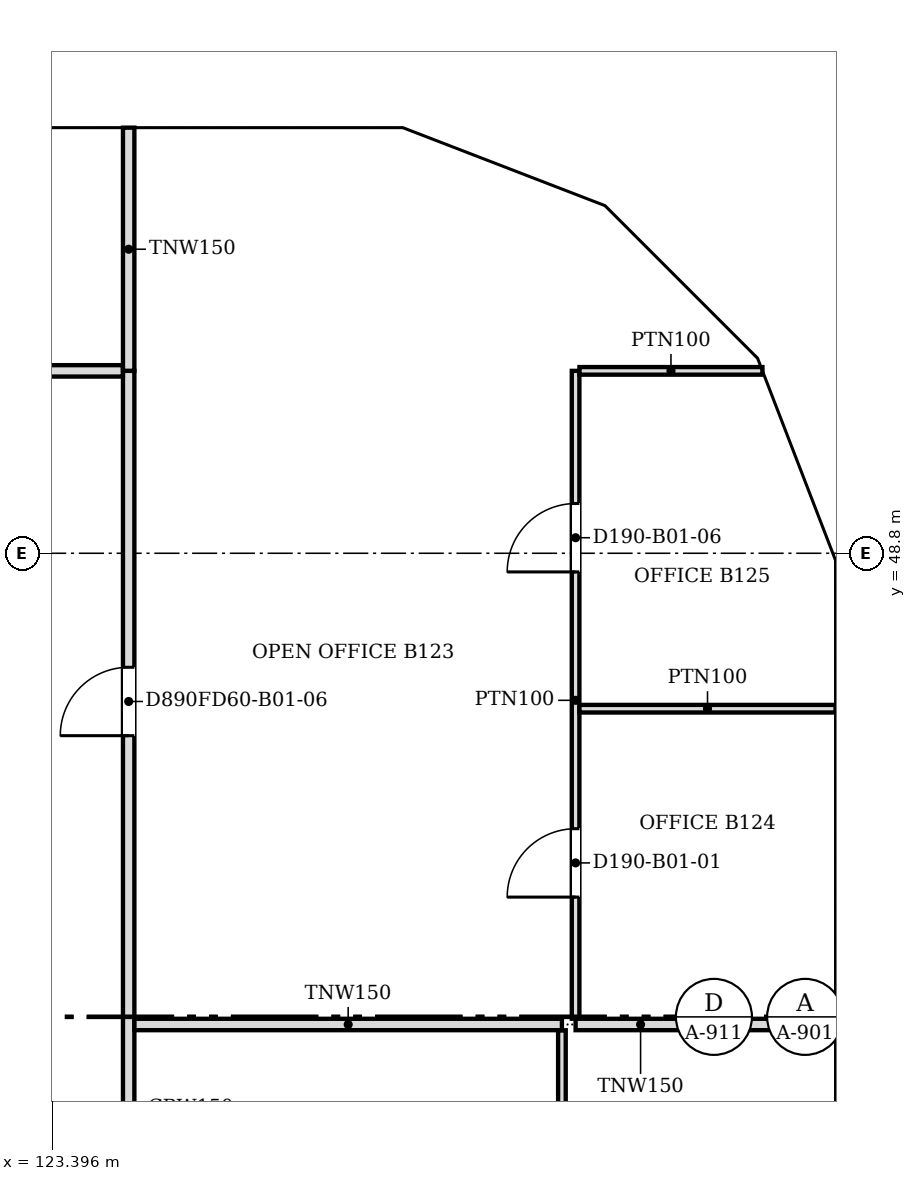
"""IFC4 building model, lengths in metres.
Left out: names, types, materials, properties, quantities, classifications, styles, units other than length and angle.
Written with IfcOpenShell. Run it as: python <this file> out.ifc"""

import sys

from ifc_helpers import new_model, si_unit, direction, frame, frame_2d, origin, place, context, subcontext, project, spatial, polyline, rectangle, outline, extrude, faceted_brep, source, transform, mapped, element, fill, save


model = new_model("IFC4")
c1 = context("Model", 3, precision=1e-05, world=origin(), true_north=direction((0.0, 1.0)))
c2 = subcontext(c1, "Body", "Model", "MODEL_VIEW")
j1 = project(units=[si_unit("LENGTHUNIT", "METRE"), si_unit("PLANEANGLEUNIT", "RADIAN")], contexts=[c1])
p1 = place(None, origin())
s1 = spatial("IfcSite", under=j1, at=p1, CompositionType="ELEMENT")
p2 = place(p1, origin())
s2 = spatial("IfcBuilding", under=s1, at=p2, CompositionType="ELEMENT")
p3 = place(p2, frame((0.0, 0.0, 16.8)))
s3 = spatial("IfcBuildingStorey", under=s2, at=p3, CompositionType="ELEMENT", Elevation=16.8)
m1 = source(origin(), c2, "Body", "Brep", [
    faceted_brep([(6.1, -0.25, 0.0), (3.05, -0.25, 4.5), (0.0, -0.25, 0.0), (6.1, -0.25, 0.0), (0.0, 0.25, 0.0), (3.05, 0.25, 4.5), (6.1, 0.25, 0.0), (6.1, 0.25, 0.0)], [[[0, 1, 2, 3]], [[4, 5, 6, 7]], [[6, 5, 1, 0]], [[5, 4, 2, 1]], [[4, 7, 3, 2]], [[3, 7, 6, 0]]]),
])
p4 = place(p3, frame((133.95, 36.6, 0.0), z_axis=(0.0, 0.0, 1.0), x_axis=(0.0, 1.0, 0.0)))
e1 = element("IfcWall", 1, at=p4, inside=s3, PredefinedType="SOLIDWALL", context=c2, shape_type="MappedRepresentation", body=[
    mapped(m1, transform((0.0, 0.0, 0.0), scale=1.0)),
])
m2 = source(origin(), c2, "Body", "SweptSolid", [
    extrude(outline(polyline([(5.629, 0.25), (3.05, 4.054), (0.471, 0.25), (5.629, 0.25)])), frame((0.0, 0.26, 0.0), z_axis=(0.0, -1.0, 0.0), x_axis=(1.0, 0.0, 0.0)), (0.0, 0.0, 1.0), 0.52),
])
p5 = place(p4, origin())
e2 = element("IfcOpeningElement", 2, at=p5, cuts=e1, PredefinedType="OPENING", context=c2, shape_type="MappedRepresentation", body=[
    mapped(m2, transform((0.0, 0.0, 0.0), scale=1.0)),
])
m3 = source(origin(), c2, "Body", "Brep", [
    faceted_brep([(6.053, -0.25, 0.0), (3.05, -0.25, 4.5), (0.0, -0.25, 0.0), (0.0, 0.25, 0.0), (3.05, 0.25, 4.5), (6.007, 0.25, 0.07), (6.007, 0.25, 0.0), (6.053, 0.0, 0.0)], [[[0, 1, 2]], [[3, 4, 5, 6]], [[5, 4, 1, 0, 7]], [[4, 3, 2, 1]], [[3, 6, 7, 0, 2]], [[7, 6, 5]]]),
])
p6 = place(p3, frame((133.95, 42.7, 0.0), z_axis=(0.0, 0.0, 1.0), x_axis=(0.0, 1.0, 0.0)))
e3 = element("IfcWall", 3, at=p6, inside=s3, PredefinedType="SOLIDWALL", context=c2, shape_type="MappedRepresentation", body=[
    mapped(m3, transform((0.0, 0.0, 0.0), scale=1.0)),
])
m4 = source(origin(), c2, "Body", "SweptSolid", [
    extrude(outline(polyline([(5.586, 0.25), (3.048, 4.052), (0.471, 0.25), (5.586, 0.25)])), frame((0.0, 0.26, 0.0), z_axis=(0.0, -1.0, 0.0), x_axis=(1.0, 0.0, 0.0)), (0.0, 0.0, 1.0), 0.52),
])
p7 = place(p6, origin())
e4 = element("IfcOpeningElement", 4, at=p7, cuts=e3, PredefinedType="OPENING", context=c2, shape_type="MappedRepresentation", body=[
    mapped(m4, transform((0.0, 0.0, 0.0), scale=1.0)),
])
m5 = source(origin(), c2, "Body", "Brep", [
    faceted_brep([(3.003, -0.25, 4.419), (2.95, -0.25, 4.5), (0.0, -0.25, 0.0), (3.003, -0.25, 0.0), (0.047, 0.25, 0.071), (2.898, 0.25, 4.419), (2.898, 0.25, 0.0), (0.047, 0.25, 0.0), (2.95, 0.0, 4.5), (0.0, 0.0, 0.0)], [[[0, 1, 2, 3]], [[4, 5, 6, 7]], [[8, 1, 0]], [[5, 4, 9, 2, 1, 8]], [[7, 6, 3, 2, 9]], [[7, 9, 4]], [[3, 6, 5, 8, 0]]]),
])
p8 = place(p3, frame((133.95, 48.753, 0.0), z_axis=(0.0, 0.0, 1.0), x_axis=(-0.359855894603, 0.933007896601, 0.0)))
e5 = element("IfcWall", 5, at=p8, inside=s3, PredefinedType="SOLIDWALL", context=c2, shape_type="MappedRepresentation", body=[
    mapped(m5, transform((0.0, 0.0, 0.0), scale=1.0)),
])
m6 = source(origin(), c2, "Body", "SweptSolid", [
    extrude(outline(polyline([(2.75, 3.739), (0.463, 0.25), (2.75, 0.25), (2.75, 3.739)])), frame((0.0, 0.26, 0.0), z_axis=(0.0, -1.0, 0.0), x_axis=(1.0, 0.0, 0.0)), (0.0, 0.0, 1.0), 0.52),
])
p9 = place(p8, origin())
e6 = element("IfcOpeningElement", 6, at=p9, cuts=e5, PredefinedType="OPENING", context=c2, shape_type="MappedRepresentation", body=[
    mapped(m6, transform((0.0, 0.0, 0.0), scale=1.0)),
])
m7 = source(origin(), c2, "Body", "Brep", [
    faceted_brep([(2.997, -0.25, 0.0), (0.053, -0.25, 4.5), (0.0, -0.25, 4.419), (0.0, -0.25, 0.0), (0.106, 0.25, 4.419), (2.944, 0.25, 0.081), (2.944, 0.25, 0.0), (0.106, 0.25, 0.0), (0.053, 0.0, 4.5), (2.997, 0.0, 0.0)], [[[0, 1, 2, 3]], [[4, 5, 6, 7]], [[5, 4, 8, 1, 0, 9]], [[2, 1, 8]], [[7, 6, 9, 0, 3]], [[7, 3, 2, 8, 4]], [[9, 6, 5]]]),
])
p10 = place(p3, frame((132.926, 51.469, 0.0), z_axis=(0.0, 0.0, 1.0), x_axis=(-0.707066050402, 0.707147509625, 0.0)))
e7 = element("IfcWall", 7, at=p10, inside=s3, PredefinedType="SOLIDWALL", context=c2, shape_type="MappedRepresentation", body=[
    mapped(m7, transform((0.0, 0.0, 0.0), scale=1.0)),
])
m8 = source(origin(), c2, "Body", "SweptSolid", [
    extrude(outline(polyline([(2.535, 0.25), (0.253, 3.738), (0.253, 0.25), (2.535, 0.25)])), frame((0.0, 0.26, 0.0), z_axis=(0.0, -1.0, 0.0), x_axis=(1.0, 0.0, 0.0)), (0.0, 0.0, 1.0), 0.52),
])
p11 = place(p10, origin())
e8 = element("IfcOpeningElement", 8, at=p11, cuts=e7, PredefinedType="OPENING", context=c2, shape_type="MappedRepresentation", body=[
    mapped(m8, transform((0.0, 0.0, 0.0), scale=1.0)),
])
m9 = source(origin(), c2, "Body", "Brep", [
    faceted_brep([(2.997, -0.25, 4.43), (2.95, -0.25, 4.5), (0.0, -0.25, 0.0), (2.997, -0.25, 0.0), (0.053, 0.25, 0.081), (2.904, 0.25, 4.429), (2.904, 0.25, 0.0), (0.053, 0.25, 0.0), (2.95, 0.0, 4.5), (0.0, 0.0, 0.0)], [[[0, 1, 2, 3]], [[4, 5, 6, 7]], [[8, 1, 0]], [[5, 4, 9, 2, 1, 8]], [[7, 6, 3, 2, 9]], [[7, 9, 4]], [[3, 6, 5, 8, 0]]]),
])
p12 = place(p3, frame((130.806, 53.588, 0.0), z_axis=(0.0, 0.0, 1.0), x_axis=(-0.932990326376, 0.359901446078, 0.0)))
e9 = element("IfcWall", 9, at=p12, inside=s3, PredefinedType="SOLIDWALL", context=c2, shape_type="MappedRepresentation", body=[
    mapped(m9, transform((0.0, 0.0, 0.0), scale=1.0)),
])
p13 = place(p12, origin())
e10 = element("IfcOpeningElement", 10, at=p13, cuts=e9, PredefinedType="OPENING", context=c2, shape_type="MappedRepresentation", body=[
    mapped(m6, transform((0.0, 0.0, 0.0), scale=1.0)),
])
m10 = source(origin(), c2, "Body", "Brep", [
    faceted_brep([(3.05, -0.25, 0.0), (0.047, -0.25, 4.5), (0.0, -0.25, 4.429), (0.0, -0.25, 0.0), (0.093, 0.25, 4.43), (3.05, 0.25, 0.0), (0.093, 0.25, 0.0), (0.047, 0.0, 4.5)], [[[0, 1, 2, 3]], [[4, 5, 6]], [[5, 4, 7, 1, 0]], [[2, 1, 7]], [[6, 5, 0, 3]], [[6, 3, 2, 7, 4]]]),
])
p14 = place(p3, frame((128.1, 54.65, 0.0), z_axis=(0.0, 0.0, 1.0), x_axis=(-1.0, 0.0, 0.0)))
e11 = element("IfcWall", 11, at=p14, inside=s3, PredefinedType="SOLIDWALL", context=c2, shape_type="MappedRepresentation", body=[
    mapped(m10, transform((0.0, 0.0, 0.0), scale=1.0)),
])
m11 = source(origin(), c2, "Body", "SweptSolid", [
    extrude(outline(polyline([(2.583, 0.25), (0.247, 3.75), (0.247, 0.25), (2.583, 0.25)])), frame((0.0, 0.26, 0.0), z_axis=(0.0, -1.0, 0.0), x_axis=(1.0, 0.0, 0.0)), (0.0, 0.0, 1.0), 0.52),
])
p15 = place(p14, origin())
e12 = element("IfcOpeningElement", 12, at=p15, cuts=e11, PredefinedType="OPENING", context=c2, shape_type="MappedRepresentation", body=[
    mapped(m11, transform((0.0, 0.0, 0.0), scale=1.0)),
])
m12 = source(origin(), c2, "Body", "SweptSolid", [
    extrude(outline(polyline([(6.1, 0.0), (3.05, 4.5), (0.0, 0.0), (6.1, 0.0)])), frame((0.0, 0.25, 0.0), z_axis=(0.0, -1.0, 0.0), x_axis=(1.0, 0.0, 0.0)), (0.0, 0.0, 1.0), 0.5),
])
p16 = place(p3, frame((125.05, 54.65, 0.0), z_axis=(0.0, 0.0, 1.0), x_axis=(-1.0, 0.0, 0.0)))
e13 = element("IfcWall", 13, at=p16, inside=s3, PredefinedType="SOLIDWALL", context=c2, shape_type="MappedRepresentation", body=[
    mapped(m12, transform((0.0, 0.0, 0.0), scale=1.0)),
])
p17 = place(p16, origin())
e14 = element("IfcOpeningElement", 14, at=p17, cuts=e13, PredefinedType="OPENING", context=c2, shape_type="MappedRepresentation", body=[
    mapped(m2, transform((0.0, 0.0, 0.0), scale=1.0)),
])
p18 = place(p2, frame((0.0, 0.0, 21.3)))
s4 = spatial("IfcBuildingStorey", under=s2, at=p18, CompositionType="ELEMENT", Elevation=21.3)
m13 = source(origin(), c2, "Body", "SweptSolid", [
    extrude(outline(polyline([(3.05, 0.0), (6.1, 4.5), (3.05, 9.0), (0.0, 4.5), (3.05, 0.0)])), frame((0.0, 0.25, 0.0), z_axis=(0.0, -1.0, 0.0), x_axis=(1.0, 0.0, 0.0)), (0.0, 0.0, 1.0), 0.5),
])
p19 = place(p18, frame((133.95, 39.65, -4.5), z_axis=(0.0, 0.0, 1.0), x_axis=(0.0, 1.0, 0.0)))
e15 = element("IfcWall", 15, at=p19, inside=s4, PredefinedType="SOLIDWALL", context=c2, shape_type="MappedRepresentation", body=[
    mapped(m13, transform((0.0, 0.0, 0.0), scale=1.0)),
])
m14 = source(origin(), c2, "Body", "SweptSolid", [
    extrude(outline(polyline([(3.05, 0.446), (5.798, 4.5), (3.05, 8.554), (0.302, 4.5), (3.05, 0.446)])), frame((0.0, 0.26, 0.0), z_axis=(0.0, -1.0, 0.0), x_axis=(1.0, 0.0, 0.0)), (0.0, 0.0, 1.0), 0.52),
])
p20 = place(p19, origin())
e16 = element("IfcOpeningElement", 16, at=p20, cuts=e15, PredefinedType="OPENING", context=c2, shape_type="MappedRepresentation", body=[
    mapped(m14, transform((0.0, 0.0, 0.0), scale=1.0)),
])
m15 = source(origin(), c2, "Body", "Brep", [
    faceted_brep([(3.003, -0.25, 0.0), (3.05, -0.25, 0.071), (3.05, -0.25, 8.929), (3.003, -0.25, 9.0), (0.0, -0.25, 4.5), (0.0, 0.25, 4.5), (2.957, 0.25, 8.93), (2.957, 0.25, 0.07), (3.003, 0.0, 0.0), (3.003, 0.0, 9.0)], [[[0, 1, 2, 3, 4]], [[5, 6, 7]], [[1, 0, 8]], [[9, 3, 2]], [[6, 5, 4, 3, 9]], [[5, 7, 8, 0, 4]], [[1, 8, 7, 6, 9, 2]]]),
])
p21 = place(p18, frame((133.95, 45.75, -4.5), z_axis=(0.0, 0.0, 1.0), x_axis=(0.0, 1.0, 0.0)))
e17 = element("IfcWall", 17, at=p21, inside=s4, PredefinedType="SOLIDWALL", context=c2, shape_type="MappedRepresentation", body=[
    mapped(m15, transform((0.0, 0.0, 0.0), scale=1.0)),
])
m16 = source(origin(), c2, "Body", "SweptSolid", [
    extrude(outline(polyline([(2.803, 8.25), (0.301, 4.5), (2.803, 0.75), (2.803, 8.25)])), frame((0.0, 0.26, 0.0), z_axis=(0.0, -1.0, 0.0), x_axis=(1.0, 0.0, 0.0)), (0.0, 0.0, 1.0), 0.52),
])
p22 = place(p21, origin())
e18 = element("IfcOpeningElement", 18, at=p22, cuts=e17, PredefinedType="OPENING", context=c2, shape_type="MappedRepresentation", body=[
    mapped(m16, transform((0.0, 0.0, 0.0), scale=1.0)),
])
m17 = source(origin(), c2, "Body", "Brep", [
    faceted_brep([(0.047, -0.25, 0.0), (2.997, -0.25, 4.5), (0.047, -0.25, 9.0), (0.0, -0.25, 8.93), (0.0, -0.25, 0.07), (0.093, 0.25, 8.929), (2.944, 0.25, 4.581), (2.944, 0.25, 4.419), (0.093, 0.25, 0.071), (2.997, 0.0, 4.5), (0.047, 0.0, 0.0), (0.047, 0.0, 9.0)], [[[0, 1, 2, 3, 4]], [[5, 6, 7, 8]], [[8, 7, 9, 1, 0, 10]], [[6, 5, 11, 2, 1, 9]], [[3, 2, 11]], [[10, 0, 4]], [[8, 10, 4, 3, 11, 5]], [[9, 7, 6]]]),
])
p23 = place(p18, frame((133.967, 48.71, -4.5), z_axis=(0.0, 0.0, 1.0), x_axis=(-0.359901446078, 0.932990326376, 0.0)))
e19 = element("IfcWall", 19, at=p23, inside=s4, PredefinedType="SOLIDWALL", context=c2, shape_type="MappedRepresentation", body=[
    mapped(m17, transform((0.0, 0.0, 0.0), scale=1.0)),
])
m18 = source(origin(), c2, "Body", "SweptSolid", [
    extrude(outline(polyline([(0.247, 0.761), (2.698, 4.5), (0.247, 8.239), (0.247, 0.761)])), frame((0.0, 0.26, 0.0), z_axis=(0.0, -1.0, 0.0), x_axis=(1.0, 0.0, 0.0)), (0.0, 0.0, 1.0), 0.52),
])
p24 = place(p23, origin())
e20 = element("IfcOpeningElement", 20, at=p24, cuts=e19, PredefinedType="OPENING", context=c2, shape_type="MappedRepresentation", body=[
    mapped(m18, transform((0.0, 0.0, 0.0), scale=1.0)),
])
m19 = source(origin(), c2, "Body", "Brep", [
    faceted_brep([(2.944, -0.25, 0.0), (2.997, -0.25, 0.081), (2.997, -0.25, 8.919), (2.944, -0.25, 9.0), (0.0, -0.25, 4.5), (0.053, 0.25, 4.581), (2.891, 0.25, 8.919), (2.891, 0.25, 0.081), (0.053, 0.25, 4.419), (2.944, 0.0, 0.0), (2.944, 0.0, 9.0), (0.0, 0.0, 4.5)], [[[0, 1, 2, 3, 4]], [[5, 6, 7, 8]], [[1, 0, 9]], [[10, 3, 2]], [[6, 5, 11, 4, 3, 10]], [[8, 7, 9, 0, 4, 11]], [[8, 11, 5]], [[1, 9, 7, 6, 10, 2]]]),
])
p25 = place(p18, frame((132.888, 51.506, -4.5), z_axis=(0.0, 0.0, 1.0), x_axis=(-0.707147509625, 0.707066050402, 0.0)))
e21 = element("IfcWall", 21, at=p25, inside=s4, PredefinedType="SOLIDWALL", context=c2, shape_type="MappedRepresentation", body=[
    mapped(m19, transform((0.0, 0.0, 0.0), scale=1.0)),
])
m20 = source(origin(), c2, "Body", "SweptSolid", [
    extrude(outline(polyline([(2.744, 8.238), (0.299, 4.5), (2.744, 0.762), (2.744, 8.238)])), frame((0.0, 0.26, 0.0), z_axis=(0.0, -1.0, 0.0), x_axis=(1.0, 0.0, 0.0)), (0.0, 0.0, 1.0), 0.52),
])
p26 = place(p25, origin())
e22 = element("IfcOpeningElement", 22, at=p26, cuts=e21, PredefinedType="OPENING", context=c2, shape_type="MappedRepresentation", body=[
    mapped(m20, transform((0.0, 0.0, 0.0), scale=1.0)),
])
m21 = source(origin(), c2, "Body", "Brep", [
    faceted_brep([(0.053, -0.25, 0.0), (3.003, -0.25, 4.5), (0.053, -0.25, 9.0), (0.0, -0.25, 8.919), (0.0, -0.25, 0.081), (0.106, 0.25, 8.919), (2.957, 0.25, 4.571), (2.957, 0.25, 4.429), (0.106, 0.25, 0.081), (3.003, 0.0, 4.5), (0.053, 0.0, 0.0), (0.053, 0.0, 9.0)], [[[0, 1, 2, 3, 4]], [[5, 6, 7, 8]], [[8, 7, 9, 1, 0, 10]], [[6, 5, 11, 2, 1, 9]], [[3, 2, 11]], [[10, 0, 4]], [[8, 10, 4, 3, 11, 5]], [[9, 7, 6]]]),
])
p27 = place(p18, frame((130.856, 53.569, -4.5), z_axis=(0.0, 0.0, 1.0), x_axis=(-0.933007896601, 0.359855894603, 0.0)))
e23 = element("IfcWall", 23, at=p27, inside=s4, PredefinedType="SOLIDWALL", context=c2, shape_type="MappedRepresentation", body=[
    mapped(m21, transform((0.0, 0.0, 0.0), scale=1.0)),
])
m22 = source(origin(), c2, "Body", "SweptSolid", [
    extrude(outline(polyline([(0.253, 0.761), (2.705, 4.5), (0.253, 8.239), (0.253, 0.761)])), frame((0.0, 0.26, 0.0), z_axis=(0.0, -1.0, 0.0), x_axis=(1.0, 0.0, 0.0)), (0.0, 0.0, 1.0), 0.52),
])
p28 = place(p27, origin())
e24 = element("IfcOpeningElement", 24, at=p28, cuts=e23, PredefinedType="OPENING", context=c2, shape_type="MappedRepresentation", body=[
    mapped(m22, transform((0.0, 0.0, 0.0), scale=1.0)),
])
m23 = source(origin(), c2, "Body", "Brep", [
    faceted_brep([(3.003, -0.25, 0.0), (6.053, -0.25, 4.5), (3.003, -0.25, 9.0), (0.0, -0.25, 4.5), (0.047, 0.25, 4.57), (3.003, 0.25, 9.0), (6.053, 0.25, 4.5), (3.003, 0.25, 0.0), (0.047, 0.25, 4.43), (0.0, 0.0, 4.5)], [[[0, 1, 2, 3]], [[4, 5, 6, 7, 8]], [[7, 6, 1, 0]], [[6, 5, 2, 1]], [[5, 4, 9, 3, 2]], [[8, 7, 0, 3, 9]], [[8, 9, 4]]]),
])
p29 = place(p18, frame((128.053, 54.65, -4.5), z_axis=(0.0, 0.0, 1.0), x_axis=(-1.0, 0.0, 0.0)))
e25 = element("IfcWall", 25, at=p29, inside=s4, PredefinedType="SOLIDWALL", context=c2, shape_type="MappedRepresentation", body=[
    mapped(m23, transform((0.0, 0.0, 0.0), scale=1.0)),
])
m24 = source(origin(), c2, "Body", "SweptSolid", [
    extrude(outline(polyline([(3.005, 0.448), (5.751, 4.5), (3.005, 8.552), (0.301, 4.5), (3.005, 0.448)])), frame((0.0, 0.26, 0.0), z_axis=(0.0, -1.0, 0.0), x_axis=(1.0, 0.0, 0.0)), (0.0, 0.0, 1.0), 0.52),
])
p30 = place(p29, origin())
e26 = element("IfcOpeningElement", 26, at=p30, cuts=e25, PredefinedType="OPENING", context=c2, shape_type="MappedRepresentation", body=[
    mapped(m24, transform((0.0, 0.0, 0.0), scale=1.0)),
])
p31 = place(p3, frame((124.4, 51.2, 0.0), z_axis=(0.0, 0.0, 1.0), x_axis=(0.0, -1.0, 0.0)))
e27 = element("IfcWall", 27, at=p31, inside=s3, PredefinedType="PARTITIONING", context=c2, shape_type="SweptSolid", body=[
    extrude(rectangle(XDim=14.6, YDim=0.15, at=frame_2d((7.3, 0.0))), origin(), (0.0, 0.0, 1.0), 3.415),
])
m25 = source(origin(), c2, "Body", "SweptSolid", [
    extrude(rectangle(XDim=0.9, YDim=2.1, at=frame_2d((0.45, 1.05))), frame((0.0, 0.085, 0.0), z_axis=(0.0, -1.0, 0.0), x_axis=(1.0, 0.0, 0.0)), (0.0, 0.0, 1.0), 0.17),
])
p32 = place(p31, frame((3.9, 0.0, 0.0)))
e28 = element("IfcOpeningElement", 28, at=p32, cuts=e27, PredefinedType="OPENING", context=c2, shape_type="MappedRepresentation", body=[
    mapped(m25, transform((0.0, 0.0, 0.0), scale=1.0)),
])
p33 = place(p3, frame((130.1, 42.524, 0.0), z_axis=(0.0, 0.0, 1.0), x_axis=(0.0, -1.0, 0.0)))
e29 = element("IfcWall", 29, at=p33, inside=s3, PredefinedType="PARTITIONING", context=c2, shape_type="SweptSolid", body=[
    extrude(rectangle(XDim=5.848, YDim=0.1, at=frame_2d((2.924, 0.0))), origin(), (0.0, 0.0, 1.0), 3.415),
])
m26 = source(origin(), c2, "Body", "SweptSolid", [
    extrude(rectangle(XDim=0.9, YDim=2.1, at=frame_2d((0.45, 1.05))), frame((0.0, 0.06, 0.0), z_axis=(0.0, -1.0, 0.0), x_axis=(1.0, 0.0, 0.0)), (0.0, 0.0, 1.0), 0.12),
])
p34 = place(p33, frame((2.448, 0.0, 0.0)))
e30 = element("IfcOpeningElement", 30, at=p34, cuts=e29, PredefinedType="OPENING", context=c2, shape_type="MappedRepresentation", body=[
    mapped(m26, transform((0.0, 0.0, 0.0), scale=1.0)),
])
p35 = place(p3, frame((124.476, 42.6, 0.0), z_axis=(0.0, 0.0, 1.0), x_axis=(1.0, 0.0, 0.0)))
e31 = element("IfcWall", 31, at=p35, inside=s3, PredefinedType="PARTITIONING", context=c2, shape_type="SweptSolid", body=[
    extrude(rectangle(XDim=5.624, YDim=0.15, at=frame_2d((2.812, 0.0))), origin(), (0.0, 0.0, 1.0), 3.415),
])
p36 = place(p3, frame((130.28, 42.6, 0.0), z_axis=(0.0, 0.0, 1.0), x_axis=(1.0, 0.0, 0.0)))
e32 = element("IfcWall", 32, at=p36, inside=s3, PredefinedType="PARTITIONING", context=c2, shape_type="SweptSolid", body=[
    extrude(rectangle(XDim=3.42, YDim=0.15, at=frame_2d((1.71, 0.0))), origin(), (0.0, 0.0, 1.0), 3.415),
])
p37 = place(p3, frame((130.28, 51.2, 0.0), z_axis=(0.0, 0.0, 1.0), x_axis=(0.0, -1.0, 0.0)))
e33 = element("IfcWall", 33, at=p37, inside=s3, PredefinedType="PARTITIONING", context=c2, shape_type="SweptSolid", body=[
    extrude(rectangle(XDim=8.524, YDim=0.1, at=frame_2d((4.262, 0.0))), origin(), (0.0, 0.0, 1.0), 3.415),
])
p38 = place(p37, frame((6.024, 0.0, 0.0)))
e34 = element("IfcOpeningElement", 34, at=p38, cuts=e33, PredefinedType="OPENING", context=c2, shape_type="MappedRepresentation", body=[
    mapped(m26, transform((0.0, 0.0, 0.0), scale=1.0)),
])
p39 = place(p37, frame((1.745, 0.0, 0.0)))
e35 = element("IfcOpeningElement", 35, at=p39, cuts=e33, PredefinedType="OPENING", context=c2, shape_type="MappedRepresentation", body=[
    mapped(m26, transform((0.0, 0.0, 0.0), scale=1.0)),
])
p40 = place(p3, frame((130.331, 46.755, 0.0), z_axis=(0.0, 0.0, 1.0), x_axis=(1.0, 0.0, 0.0)))
e36 = element("IfcWall", 36, at=p40, inside=s3, PredefinedType="PARTITIONING", context=c2, shape_type="SweptSolid", body=[
    extrude(rectangle(XDim=3.369, YDim=0.1, at=frame_2d((1.685, 0.0))), origin(), (0.0, 0.0, 1.0), 3.415),
])
p41 = place(p3, frame((108.5, 51.2, 0.0), z_axis=(0.0, 0.0, 1.0), x_axis=(1.0, 0.0, 0.0)))
e37 = element("IfcWall", 37, at=p41, inside=s3, PredefinedType="PARTITIONING", context=c2, shape_type="SweptSolid", body=[
    extrude(rectangle(XDim=15.824, YDim=0.15, at=frame_2d((7.912, 0.0))), origin(), (0.0, 0.0, 1.0), 3.415),
])
p42 = place(p41, frame((11.451, 0.0, 0.0)))
e38 = element("IfcOpeningElement", 38, at=p42, cuts=e37, PredefinedType="OPENING", context=c2, shape_type="MappedRepresentation", body=[
    mapped(m25, transform((0.0, 0.0, 0.0), scale=1.0)),
])
p43 = place(p41, frame((3.6, 0.0, 0.0)))
e39 = element("IfcOpeningElement", 39, at=p43, cuts=e37, PredefinedType="OPENING", context=c2, shape_type="MappedRepresentation", body=[
    mapped(m25, transform((0.0, 0.0, 0.0), scale=1.0)),
])
p44 = place(p3, frame((124.4, 51.201, 0.0), z_axis=(0.0, 0.0, 1.0), x_axis=(0.0, 1.0, 0.0)))
e40 = element("IfcWall", 40, at=p44, inside=s3, PredefinedType="PARTITIONING", context=c2, shape_type="SweptSolid", body=[
    extrude(rectangle(XDim=3.199, YDim=0.15, at=frame_2d((1.6, 0.0))), origin(), (0.0, 0.0, 1.0), 3.415),
])
p45 = place(p3, frame((130.331, 51.2, 0.0), z_axis=(0.0, 0.0, 1.0), x_axis=(1.0, 0.0, 0.0)))
e41 = element("IfcWall", 41, at=p45, inside=s3, PredefinedType="PARTITIONING", context=c2, shape_type="SweptSolid", body=[
    extrude(rectangle(XDim=2.407, YDim=0.1, at=frame_2d((1.204, 0.0))), origin(), (0.0, 0.0, 1.0), 3.415),
])
m27 = source(origin(), c2, "Body", "SweptSolid", [
    extrude(rectangle(XDim=0.9, YDim=2.1, at=frame_2d((0.45, 1.05))), frame((0.0, 0.025, 0.0), z_axis=(0.0, -1.0, 0.0), x_axis=(1.0, 0.0, 0.0)), (0.0, 0.0, 1.0), 0.05),
])
p46 = place(p38, origin())
e42 = element("IfcDoor", 42, at=p46, inside=s3, OperationType="SINGLE_SWING_RIGHT", PredefinedType="DOOR", context=c2, shape_type="MappedRepresentation", body=[
    mapped(m27, transform((0.0, 0.0, 0.0), scale=1.0)),
])
fill(e34, e42)
p47 = place(p39, origin())
e43 = element("IfcDoor", 43, at=p47, inside=s3, OperationType="SINGLE_SWING_RIGHT", PredefinedType="DOOR", context=c2, shape_type="MappedRepresentation", body=[
    mapped(m27, transform((0.0, 0.0, 0.0), scale=1.0)),
])
fill(e35, e43)
p48 = place(p32, origin())
e44 = element("IfcDoor", 44, at=p48, inside=s3, OperationType="SINGLE_SWING_RIGHT", PredefinedType="DOOR", context=c2, shape_type="MappedRepresentation", body=[
    mapped(m27, transform((0.0, 0.0, 0.0), scale=1.0)),
])
fill(e28, e44)
save(model, sys.argv[1])
